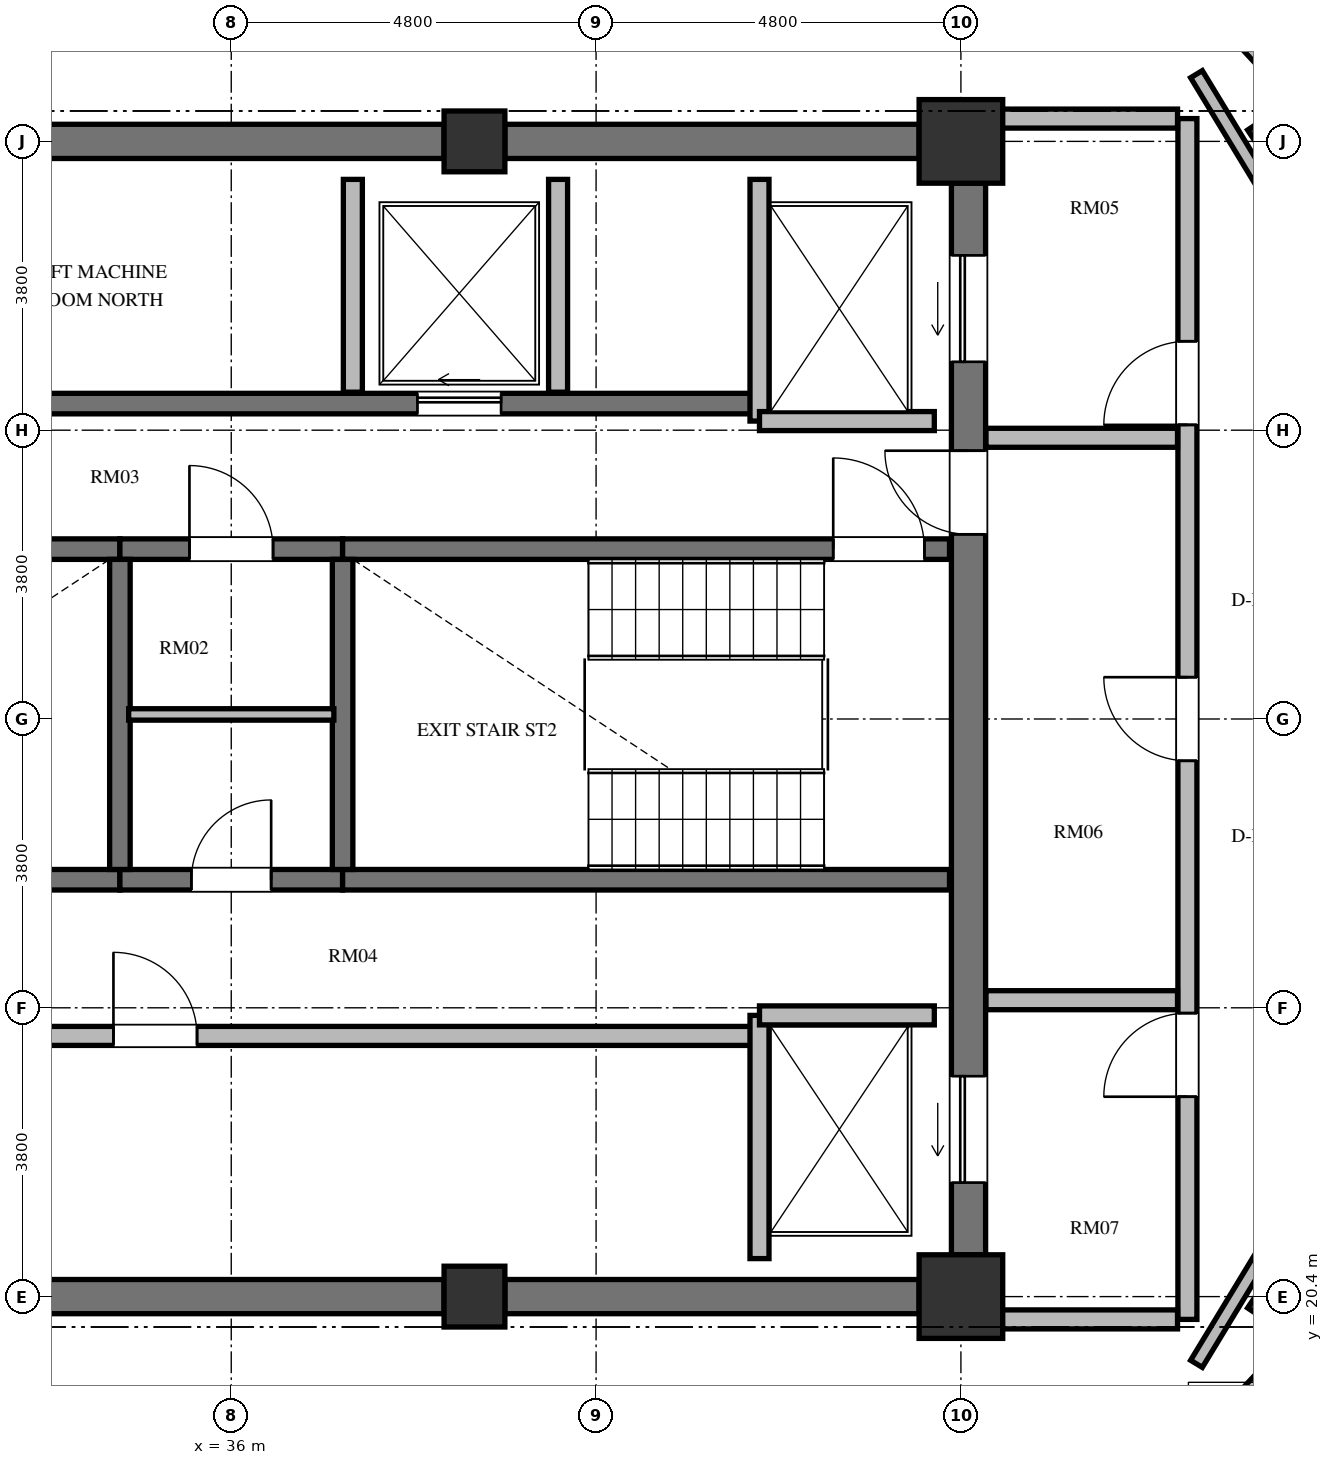
"""IFC4 building model, lengths in metres.
Left out: names, types, materials, properties, quantities, classifications, styles, units other than length and angle.
Written with IfcOpenShell. Run it as: python <this file> out.ifc"""

import sys

from ifc_helpers import new_model, si_unit, direction, frame, frame_2d, origin, origin_2d, place, context, subcontext, project, spatial, rectangle, extrude, element, fill, save


model = new_model("IFC4")
c1 = context("Model", 3, precision=1e-05, world=origin(), true_north=direction((0.0, 1.0)))
c2 = subcontext(c1, "Body", "Model", "MODEL_VIEW")
j1 = project(units=[si_unit("LENGTHUNIT", "METRE"), si_unit("PLANEANGLEUNIT", "RADIAN")], contexts=[c1])
p1 = place(None, origin())
s1 = spatial("IfcSite", under=j1, at=p1, CompositionType="ELEMENT")
p2 = place(p1, origin())
s2 = spatial("IfcBuilding", under=s1, at=p2, CompositionType="ELEMENT")
p3 = place(p2, frame((0.0, 0.0, 312.612)))
s3 = spatial("IfcBuildingStorey", under=s2, at=p3, CompositionType="ELEMENT", Elevation=312.612)
for number, where, z_axis, x_axis in (
    (1, (50.052, 20.278, 0.0), (0.0, 0.0, 1.0), (0.831, -0.556, 0.0)),
    (2, (50.052, 35.722, 0.0), (0.0, 0.0, 1.0), (0.831, 0.556, 0.0)),
):
    element("IfcColumn", number, at=place(p3, frame(where, z_axis=z_axis, x_axis=x_axis)), inside=s3, PredefinedType="COLUMN", context=c2, shape_type="SweptSolid", body=[
        extrude(rectangle(XDim=1.1, YDim=0.8, at=origin_2d()), origin(), (0.0, 0.0, 1.0), 3.388),
    ])
p4 = place(p3, frame((39.2, 20.4, 0.0), z_axis=(0.0, 0.0, 1.0), x_axis=(1.0, 0.0, 0.0)))
e3 = element("IfcColumn", 3, at=p4, inside=s3, PredefinedType="COLUMN", context=c2, shape_type="SweptSolid", body=[
    extrude(rectangle(XDim=0.8, YDim=0.8, at=origin_2d()), origin(), (0.0, 0.0, 1.0), 3.388),
])
for number, where, z_axis, x_axis in (
    (4, (45.6, 20.4, 0.0), (0.0, 0.0, 1.0), (1.0, 0.0, 0.0)),
    (5, (45.6, 35.6, 0.0), (0.0, 0.0, 1.0), (1.0, 0.0, 0.0)),
):
    element("IfcColumn", number, at=place(p3, frame(where, z_axis=z_axis, x_axis=x_axis)), inside=s3, PredefinedType="COLUMN", context=c2, shape_type="SweptSolid", body=[
        extrude(rectangle(XDim=1.1, YDim=1.1, at=origin_2d()), origin(), (0.0, 0.0, 1.0), 3.388),
    ])
p5 = place(p3, frame((39.2, 35.6, 0.0), z_axis=(0.0, 0.0, 1.0), x_axis=(1.0, 0.0, 0.0)))
e6 = element("IfcColumn", 6, at=p5, inside=s3, PredefinedType="COLUMN", context=c2, shape_type="SweptSolid", body=[
    extrude(rectangle(XDim=0.8, YDim=0.8, at=origin_2d()), origin(), (0.0, 0.0, 1.0), 3.388),
])
p6 = place(p3, frame((45.7, 20.95, 0.0), z_axis=(0.0, 0.0, 1.0), x_axis=(0.0, 1.0, 0.0)))
e7 = element("IfcWall", 7, at=p6, inside=s3, PredefinedType="SHEAR", context=c2, shape_type="SweptSolid", body=[
    extrude(rectangle(XDim=14.1, YDim=0.45, at=frame_2d((7.05, 0.0))), origin(), (0.0, 0.0, 1.0), 3.388),
])
p7 = place(p6, frame((11.75, 0.0, 0.0)))
e8 = element("IfcOpeningElement", 8, at=p7, cuts=e7, PredefinedType="OPENING", context=c2, shape_type="SweptSolid", body=[
    extrude(rectangle(XDim=1.4, YDim=2.3, at=frame_2d((0.7, 1.15))), frame((0.0, 0.235, 0.0), z_axis=(0.0, -1.0, 0.0), x_axis=(1.0, 0.0, 0.0)), (0.0, 0.0, 1.0), 0.47),
])
p8 = place(p6, frame((0.95, 0.0, 0.0)))
e9 = element("IfcOpeningElement", 9, at=p8, cuts=e7, PredefinedType="OPENING", context=c2, shape_type="SweptSolid", body=[
    extrude(rectangle(XDim=1.4, YDim=2.3, at=frame_2d((0.7, 1.15))), frame((0.0, 0.235, 0.0), z_axis=(0.0, -1.0, 0.0), x_axis=(1.0, 0.0, 0.0)), (0.0, 0.0, 1.0), 0.47),
])
p9 = place(p6, frame((9.48, 0.0, 0.0)))
e10 = element("IfcOpeningElement", 10, at=p9, cuts=e7, PredefinedType="OPENING", context=c2, shape_type="SweptSolid", body=[
    extrude(rectangle(XDim=1.1, YDim=2.15, at=frame_2d((0.55, 1.075))), frame((0.0, 0.235, 0.0), z_axis=(0.0, -1.0, 0.0), x_axis=(1.0, 0.0, 0.0)), (0.0, 0.0, 1.0), 0.47),
])
for number, where, z_axis, x_axis in (
    (11, (33.2, 20.4, 0.0), (0.0, 0.0, 1.0), (1.0, 0.0, 0.0)),
    (12, (33.2, 35.6, 0.0), (0.0, 0.0, 1.0), (1.0, 0.0, 0.0)),
):
    element("IfcWall", number, at=place(p3, frame(where, z_axis=z_axis, x_axis=x_axis)), inside=s3, PredefinedType="SHEAR", context=c2, shape_type="SweptSolid", body=[
        extrude(rectangle(XDim=5.6, YDim=0.45, at=frame_2d((2.8, 0.0))), origin(), (0.0, 0.0, 1.0), 3.388),
    ])
for number, where, z_axis, x_axis in (
    (13, (39.6, 20.4, 0.0), (0.0, 0.0, 1.0), (1.0, 0.0, 0.0)),
    (14, (39.6, 35.6, 0.0), (0.0, 0.0, 1.0), (1.0, 0.0, 0.0)),
):
    element("IfcWall", number, at=place(p3, frame(where, z_axis=z_axis, x_axis=x_axis)), inside=s3, PredefinedType="SHEAR", context=c2, shape_type="SweptSolid", body=[
        extrude(rectangle(XDim=5.45, YDim=0.45, at=frame_2d((2.725, 0.0))), origin(), (0.0, 0.0, 1.0), 3.388),
    ])
for number, where, z_axis, x_axis in (
    (15, (48.18, 17.772, 0.0), (0.0, 0.0, 1.0), (0.68, 0.733, 0.0)),
    (16, (51.098, 35.082, 0.0), (0.0, 0.0, 1.0), (-0.68, 0.733, 0.0)),
):
    element("IfcWall", number, at=place(p3, frame(where, z_axis=z_axis, x_axis=x_axis)), inside=s3, PredefinedType="SOLIDWALL", context=c2, shape_type="SweptSolid", body=[
        extrude(rectangle(XDim=4.291, YDim=0.28, at=frame_2d((2.146, 0.0))), origin(), (0.0, 0.0, 1.0), 3.008),
    ])
p10 = place(p3, frame((26.55, 30.235, 0.0), z_axis=(0.0, 0.0, 1.0), x_axis=(1.0, 0.0, 0.0)))
e17 = element("IfcWall", 17, at=p10, inside=s3, PredefinedType="SHEAR", context=c2, shape_type="SweptSolid", body=[
    extrude(rectangle(XDim=7.985, YDim=0.27, at=frame_2d((3.992, 0.0))), origin(), (0.0, 0.0, 1.0), 3.388),
])
p11 = place(p3, frame((34.535, 30.235, 0.0), z_axis=(0.0, 0.0, 1.0), x_axis=(1.0, 0.0, 0.0)))
e18 = element("IfcWall", 18, at=p11, inside=s3, PredefinedType="SHEAR", context=c2, shape_type="SweptSolid", body=[
    extrude(rectangle(XDim=2.93, YDim=0.27, at=frame_2d((1.465, 0.0))), origin(), (0.0, 0.0, 1.0), 3.388),
])
p12 = place(p11, frame((0.915, 0.0, 0.0)))
e19 = element("IfcOpeningElement", 19, at=p12, cuts=e18, PredefinedType="OPENING", context=c2, shape_type="SweptSolid", body=[
    extrude(rectangle(XDim=1.1, YDim=2.15, at=frame_2d((0.55, 1.075))), frame((0.0, 0.145, 0.0), z_axis=(0.0, -1.0, 0.0), x_axis=(1.0, 0.0, 0.0)), (0.0, 0.0, 1.0), 0.29),
])
p13 = place(p3, frame((37.465, 30.235, 0.0), z_axis=(0.0, 0.0, 1.0), x_axis=(1.0, 0.0, 0.0)))
e20 = element("IfcWall", 20, at=p13, inside=s3, PredefinedType="SHEAR", context=c2, shape_type="SweptSolid", body=[
    extrude(rectangle(XDim=7.985, YDim=0.27, at=frame_2d((3.992, 0.0))), origin(), (0.0, 0.0, 1.0), 3.388),
])
p14 = place(p13, frame((6.455, 0.0, 0.0)))
e21 = element("IfcOpeningElement", 21, at=p14, cuts=e20, PredefinedType="OPENING", context=c2, shape_type="SweptSolid", body=[
    extrude(rectangle(XDim=1.2, YDim=2.15, at=frame_2d((0.6, 1.075))), frame((0.0, 0.145, 0.0), z_axis=(0.0, -1.0, 0.0), x_axis=(1.0, 0.0, 0.0)), (0.0, 0.0, 1.0), 0.29),
])
p15 = place(p3, frame((26.55, 25.885, 0.0), z_axis=(0.0, 0.0, 1.0), x_axis=(1.0, 0.0, 0.0)))
e22 = element("IfcWall", 22, at=p15, inside=s3, PredefinedType="SHEAR", context=c2, shape_type="SweptSolid", body=[
    extrude(rectangle(XDim=7.985, YDim=0.27, at=frame_2d((3.992, 0.0))), origin(), (0.0, 0.0, 1.0), 3.388),
])
p16 = place(p3, frame((34.535, 25.885, 0.0), z_axis=(0.0, 0.0, 1.0), x_axis=(1.0, 0.0, 0.0)))
e23 = element("IfcWall", 23, at=p16, inside=s3, PredefinedType="SHEAR", context=c2, shape_type="SweptSolid", body=[
    extrude(rectangle(XDim=2.93, YDim=0.27, at=frame_2d((1.465, 0.0))), origin(), (0.0, 0.0, 1.0), 3.388),
])
p17 = place(p16, frame((0.94, 0.0, 0.0)))
e24 = element("IfcOpeningElement", 24, at=p17, cuts=e23, PredefinedType="OPENING", context=c2, shape_type="SweptSolid", body=[
    extrude(rectangle(XDim=1.05, YDim=2.15, at=frame_2d((0.525, 1.075))), frame((0.0, 0.145, 0.0), z_axis=(0.0, -1.0, 0.0), x_axis=(1.0, 0.0, 0.0)), (0.0, 0.0, 1.0), 0.29),
])
p18 = place(p3, frame((37.465, 25.885, 0.0), z_axis=(0.0, 0.0, 1.0), x_axis=(1.0, 0.0, 0.0)))
e25 = element("IfcWall", 25, at=p18, inside=s3, PredefinedType="SHEAR", context=c2, shape_type="SweptSolid", body=[
    extrude(rectangle(XDim=7.985, YDim=0.27, at=frame_2d((3.992, 0.0))), origin(), (0.0, 0.0, 1.0), 3.388),
])
for number, where, z_axis, x_axis in (
    (26, (34.535, 26.02, 0.0), (0.0, 0.0, 1.0), (0.0, 1.0, 0.0)),
    (27, (37.465, 26.02, 0.0), (0.0, 0.0, 1.0), (0.0, 1.0, 0.0)),
):
    element("IfcWall", number, at=place(p3, frame(where, z_axis=z_axis, x_axis=x_axis)), inside=s3, PredefinedType="SHEAR", context=c2, shape_type="SweptSolid", body=[
        extrude(rectangle(XDim=4.08, YDim=0.27, at=frame_2d((2.04, 0.0))), origin(), (0.0, 0.0, 1.0), 3.388),
    ])
p19 = place(p3, frame((34.65, 28.06, 0.0), z_axis=(0.0, 0.0, 1.0), x_axis=(1.0, 0.0, 0.0)))
e28 = element("IfcWall", 28, at=p19, inside=s3, PredefinedType="PARTITIONING", context=c2, shape_type="SweptSolid", body=[
    extrude(rectangle(XDim=2.7, YDim=0.15, at=frame_2d((1.35, 0.0))), origin(), (0.0, 0.0, 1.0), 3.008),
])
p20 = place(p3, frame((26.55, 32.15, 0.0), z_axis=(0.0, 0.0, 1.0), x_axis=(1.0, 0.0, 0.0)))
e29 = element("IfcWall", 29, at=p20, inside=s3, PredefinedType="SHEAR", context=c2, shape_type="SweptSolid", body=[
    extrude(rectangle(XDim=16.4, YDim=0.27, at=frame_2d((8.2, 0.0))), origin(), (0.0, 0.0, 1.0), 3.388),
])
p21 = place(p20, frame((4.9, 0.0, 0.0)))
e30 = element("IfcOpeningElement", 30, at=p21, cuts=e29, PredefinedType="OPENING", context=c2, shape_type="SweptSolid", body=[
    extrude(rectangle(XDim=1.1, YDim=2.15, at=frame_2d((0.55, 1.075))), frame((0.0, 0.145, 0.0), z_axis=(0.0, -1.0, 0.0), x_axis=(1.0, 0.0, 0.0)), (0.0, 0.0, 1.0), 0.29),
])
p22 = place(p20, frame((11.9, 0.0, 0.0)))
e31 = element("IfcOpeningElement", 31, at=p22, cuts=e29, PredefinedType="OPENING", context=c2, shape_type="SweptSolid", body=[
    extrude(rectangle(XDim=1.1, YDim=2.2, at=frame_2d((0.55, 1.1))), frame((0.0, 0.145, 0.0), z_axis=(0.0, -1.0, 0.0), x_axis=(1.0, 0.0, 0.0)), (0.0, 0.0, 1.0), 0.29),
])
p23 = place(p3, frame((26.75, 23.83, 0.0), z_axis=(0.0, 0.0, 1.0), x_axis=(1.0, 0.0, 0.0)))
e32 = element("IfcWall", 32, at=p23, inside=s3, PredefinedType="SOLIDWALL", context=c2, shape_type="SweptSolid", body=[
    extrude(rectangle(XDim=16.2, YDim=0.25, at=frame_2d((8.1, 0.0))), origin(), (0.0, 0.0, 1.0), 3.008),
])
p24 = place(p23, frame((7.7, 0.0, 0.0)))
e33 = element("IfcOpeningElement", 33, at=p24, cuts=e32, PredefinedType="OPENING", context=c2, shape_type="SweptSolid", body=[
    extrude(rectangle(XDim=1.1, YDim=2.15, at=frame_2d((0.55, 1.075))), frame((0.0, 0.135, 0.0), z_axis=(0.0, -1.0, 0.0), x_axis=(1.0, 0.0, 0.0)), (0.0, 0.0, 1.0), 0.27),
])
p25 = place(p3, frame((42.95, 31.92, 0.0), z_axis=(0.0, 0.0, 1.0), x_axis=(0.0, 1.0, 0.0)))
e34 = element("IfcWall", 34, at=p25, inside=s3, PredefinedType="SOLIDWALL", context=c2, shape_type="SweptSolid", body=[
    extrude(rectangle(XDim=3.18, YDim=0.25, at=frame_2d((1.59, 0.0))), origin(), (0.0, 0.0, 1.0), 3.008),
])
p26 = place(p3, frame((42.95, 31.92, 0.0), z_axis=(0.0, 0.0, 1.0), x_axis=(1.0, 0.0, 0.0)))
e35 = element("IfcWall", 35, at=p26, inside=s3, PredefinedType="SOLIDWALL", context=c2, shape_type="SweptSolid", body=[
    extrude(rectangle(XDim=2.3, YDim=0.25, at=frame_2d((1.15, 0.0))), origin(), (0.0, 0.0, 1.0), 3.008),
])
p27 = place(p3, frame((42.95, 20.9, 0.0), z_axis=(0.0, 0.0, 1.0), x_axis=(0.0, 1.0, 0.0)))
e36 = element("IfcWall", 36, at=p27, inside=s3, PredefinedType="SOLIDWALL", context=c2, shape_type="SweptSolid", body=[
    extrude(rectangle(XDim=3.2, YDim=0.25, at=frame_2d((1.6, 0.0))), origin(), (0.0, 0.0, 1.0), 3.008),
])
p28 = place(p3, frame((42.95, 24.1, 0.0), z_axis=(0.0, 0.0, 1.0), x_axis=(1.0, 0.0, 0.0)))
e37 = element("IfcWall", 37, at=p28, inside=s3, PredefinedType="SOLIDWALL", context=c2, shape_type="SweptSolid", body=[
    extrude(rectangle(XDim=2.3, YDim=0.25, at=frame_2d((1.15, 0.0))), origin(), (0.0, 0.0, 1.0), 3.008),
])
for number, where, z_axis, x_axis in (
    (38, (37.6, 32.3, 0.0), (0.0, 0.0, 1.0), (0.0, 1.0, 0.0)),
    (39, (40.3, 32.3, 0.0), (0.0, 0.0, 1.0), (0.0, 1.0, 0.0)),
):
    element("IfcWall", number, at=place(p3, frame(where, z_axis=z_axis, x_axis=x_axis)), inside=s3, PredefinedType="SOLIDWALL", context=c2, shape_type="SweptSolid", body=[
        extrude(rectangle(XDim=2.8, YDim=0.25, at=frame_2d((1.4, 0.0))), origin(), (0.0, 0.0, 1.0), 3.008),
    ])
p29 = place(p3, frame((48.58, 20.1, 0.0), z_axis=(0.0, 0.0, 1.0), x_axis=(0.0, 1.0, 0.0)))
e40 = element("IfcWall", 40, at=p29, inside=s3, PredefinedType="SOLIDWALL", context=c2, shape_type="SweptSolid", body=[
    extrude(rectangle(XDim=15.8, YDim=0.25, at=frame_2d((7.9, 0.0))), origin(), (0.0, 0.0, 1.0), 3.008),
])
p30 = place(p29, frame((11.77, 0.0, 0.0)))
e41 = element("IfcOpeningElement", 41, at=p30, cuts=e40, PredefinedType="OPENING", context=c2, shape_type="SweptSolid", body=[
    extrude(rectangle(XDim=1.1, YDim=2.12, at=frame_2d((0.55, 1.06))), frame((0.0, 0.135, 0.0), z_axis=(0.0, -1.0, 0.0), x_axis=(1.0, 0.0, 0.0)), (0.0, 0.0, 1.0), 0.27),
])
p31 = place(p29, frame((7.35, 0.0, 0.0)))
e42 = element("IfcOpeningElement", 42, at=p31, cuts=e40, PredefinedType="OPENING", context=c2, shape_type="SweptSolid", body=[
    extrude(rectangle(XDim=1.1, YDim=2.15, at=frame_2d((0.55, 1.075))), frame((0.0, 0.135, 0.0), z_axis=(0.0, -1.0, 0.0), x_axis=(1.0, 0.0, 0.0)), (0.0, 0.0, 1.0), 0.27),
])
p32 = place(p29, frame((2.93, 0.0, 0.0)))
e43 = element("IfcOpeningElement", 43, at=p32, cuts=e40, PredefinedType="OPENING", context=c2, shape_type="SweptSolid", body=[
    extrude(rectangle(XDim=1.1, YDim=2.12, at=frame_2d((0.55, 1.06))), frame((0.0, 0.135, 0.0), z_axis=(0.0, -1.0, 0.0), x_axis=(1.0, 0.0, 0.0)), (0.0, 0.0, 1.0), 0.27),
])
for number, where, z_axis, x_axis in (
    (44, (45.93, 35.9, 0.0), (0.0, 0.0, 1.0), (1.0, 0.0, 0.0)),
    (45, (45.93, 31.7, 0.0), (0.0, 0.0, 1.0), (1.0, 0.0, 0.0)),
    (46, (45.93, 24.3, 0.0), (0.0, 0.0, 1.0), (1.0, 0.0, 0.0)),
    (47, (45.93, 20.1, 0.0), (0.0, 0.0, 1.0), (1.0, 0.0, 0.0)),
):
    element("IfcWall", number, at=place(p3, frame(where, z_axis=z_axis, x_axis=x_axis)), inside=s3, PredefinedType="SOLIDWALL", context=c2, shape_type="SweptSolid", body=[
        extrude(rectangle(XDim=2.52, YDim=0.25, at=frame_2d((1.26, 0.0))), origin(), (0.0, 0.0, 1.0), 3.008),
    ])
p33 = place(p3, frame((48.699, 36.485, 0.0), z_axis=(0.0, 0.0, 1.0), x_axis=(0.518614420457, -0.855008235571, 0.0)))
e48 = element("IfcWall", 48, at=p33, inside=s3, PredefinedType="PARTITIONING", context=c2, shape_type="SweptSolid", body=[
    extrude(rectangle(XDim=4.187, YDim=0.18, at=frame_2d((2.094, 0.0))), origin(), (0.0, 0.0, 1.0), 3.008),
])
p34 = place(p3, frame((50.871, 23.095, 0.0), z_axis=(0.0, 0.0, 1.0), x_axis=(-0.518614420457, -0.855008235571, 0.0)))
e49 = element("IfcWall", 49, at=p34, inside=s3, PredefinedType="PARTITIONING", context=c2, shape_type="SweptSolid", body=[
    extrude(rectangle(XDim=4.187, YDim=0.18, at=frame_2d((2.094, 0.0))), origin(), (0.0, 0.0, 1.0), 3.008),
])
p35 = place(p34, frame((1.143, 0.0, 0.0)))
e50 = element("IfcOpeningElement", 50, at=p35, cuts=e49, PredefinedType="OPENING", context=c2, shape_type="SweptSolid", body=[
    extrude(rectangle(XDim=1.1, YDim=2.15, at=frame_2d((0.55, 1.075))), frame((0.0, 0.1, 0.0), z_axis=(0.0, -1.0, 0.0), x_axis=(1.0, 0.0, 0.0)), (0.0, 0.0, 1.0), 0.2),
])
p36 = place(p14, origin())
e51 = element("IfcDoor", 51, at=p36, inside=s3, OperationType="SINGLE_SWING_LEFT", PredefinedType="DOOR", context=c2, shape_type="SweptSolid", body=[
    extrude(rectangle(XDim=1.2, YDim=2.15, at=frame_2d((0.6, 1.075))), frame((0.0, 0.025, 0.0), z_axis=(0.0, -1.0, 0.0), x_axis=(1.0, 0.0, 0.0)), (0.0, 0.0, 1.0), 0.05),
])
fill(e21, e51)
p37 = place(p17, origin())
e52 = element("IfcDoor", 52, at=p37, inside=s3, OperationType="SINGLE_SWING_RIGHT", PredefinedType="DOOR", context=c2, shape_type="SweptSolid", body=[
    extrude(rectangle(XDim=1.05, YDim=2.15, at=frame_2d((0.525, 1.075))), frame((0.0, 0.025, 0.0), z_axis=(0.0, -1.0, 0.0), x_axis=(1.0, 0.0, 0.0)), (0.0, 0.0, 1.0), 0.05),
])
fill(e24, e52)
p38 = place(p12, origin())
e53 = element("IfcDoor", 53, at=p38, inside=s3, OperationType="SINGLE_SWING_LEFT", PredefinedType="DOOR", context=c2, shape_type="SweptSolid", body=[
    extrude(rectangle(XDim=1.1, YDim=2.15, at=frame_2d((0.55, 1.075))), frame((0.0, 0.025, 0.0), z_axis=(0.0, -1.0, 0.0), x_axis=(1.0, 0.0, 0.0)), (0.0, 0.0, 1.0), 0.05),
])
fill(e19, e53)
p39 = place(p24, origin())
e54 = element("IfcDoor", 54, at=p39, inside=s3, OperationType="SINGLE_SWING_LEFT", PredefinedType="DOOR", context=c2, shape_type="SweptSolid", body=[
    extrude(rectangle(XDim=1.1, YDim=2.15, at=frame_2d((0.55, 1.075))), frame((0.0, 0.025, 0.0), z_axis=(0.0, -1.0, 0.0), x_axis=(1.0, 0.0, 0.0)), (0.0, 0.0, 1.0), 0.05),
])
fill(e33, e54)
p40 = place(p22, origin())
e55 = element("IfcDoor", 55, at=p40, inside=s3, OperationType="SLIDING_TO_LEFT", PredefinedType="DOOR", context=c2, shape_type="SweptSolid", body=[
    extrude(rectangle(XDim=1.1, YDim=2.2, at=frame_2d((0.55, 1.1))), frame((0.0, 0.025, 0.0), z_axis=(0.0, -1.0, 0.0), x_axis=(1.0, 0.0, 0.0)), (0.0, 0.0, 1.0), 0.05),
])
fill(e31, e55)
p41 = place(p7, origin())
e56 = element("IfcDoor", 56, at=p41, inside=s3, OperationType="SLIDING_TO_LEFT", PredefinedType="DOOR", context=c2, shape_type="SweptSolid", body=[
    extrude(rectangle(XDim=1.4, YDim=2.3, at=frame_2d((0.7, 1.15))), frame((0.0, 0.025, 0.0), z_axis=(0.0, -1.0, 0.0), x_axis=(1.0, 0.0, 0.0)), (0.0, 0.0, 1.0), 0.05),
])
fill(e8, e56)
p42 = place(p8, origin())
e57 = element("IfcDoor", 57, at=p42, inside=s3, OperationType="SLIDING_TO_LEFT", PredefinedType="DOOR", context=c2, shape_type="SweptSolid", body=[
    extrude(rectangle(XDim=1.4, YDim=2.3, at=frame_2d((0.7, 1.15))), frame((0.0, 0.025, 0.0), z_axis=(0.0, -1.0, 0.0), x_axis=(1.0, 0.0, 0.0)), (0.0, 0.0, 1.0), 0.05),
])
fill(e9, e57)
p43 = place(p9, origin())
e58 = element("IfcDoor", 58, at=p43, inside=s3, OperationType="SINGLE_SWING_RIGHT", PredefinedType="DOOR", context=c2, shape_type="SweptSolid", body=[
    extrude(rectangle(XDim=1.1, YDim=2.15, at=frame_2d((0.55, 1.075))), frame((0.0, 0.025, 0.0), z_axis=(0.0, -1.0, 0.0), x_axis=(1.0, 0.0, 0.0)), (0.0, 0.0, 1.0), 0.05),
])
fill(e10, e58)
p44 = place(p30, origin())
e59 = element("IfcDoor", 59, at=p44, inside=s3, OperationType="SINGLE_SWING_LEFT", PredefinedType="DOOR", context=c2, shape_type="SweptSolid", body=[
    extrude(rectangle(XDim=1.1, YDim=2.12, at=frame_2d((0.55, 1.06))), frame((0.0, 0.025, 0.0), z_axis=(0.0, -1.0, 0.0), x_axis=(1.0, 0.0, 0.0)), (0.0, 0.0, 1.0), 0.05),
])
fill(e41, e59)
p45 = place(p31, origin())
e60 = element("IfcDoor", 60, at=p45, inside=s3, OperationType="SINGLE_SWING_RIGHT", PredefinedType="DOOR", context=c2, shape_type="SweptSolid", body=[
    extrude(rectangle(XDim=1.1, YDim=2.15, at=frame_2d((0.55, 1.075))), frame((0.0, 0.025, 0.0), z_axis=(0.0, -1.0, 0.0), x_axis=(1.0, 0.0, 0.0)), (0.0, 0.0, 1.0), 0.05),
])
fill(e42, e60)
p46 = place(p32, origin())
e61 = element("IfcDoor", 61, at=p46, inside=s3, OperationType="SINGLE_SWING_LEFT", PredefinedType="DOOR", context=c2, shape_type="SweptSolid", body=[
    extrude(rectangle(XDim=1.1, YDim=2.12, at=frame_2d((0.55, 1.06))), frame((0.0, 0.025, 0.0), z_axis=(0.0, -1.0, 0.0), x_axis=(1.0, 0.0, 0.0)), (0.0, 0.0, 1.0), 0.05),
])
fill(e43, e61)
save(model, sys.argv[1])
